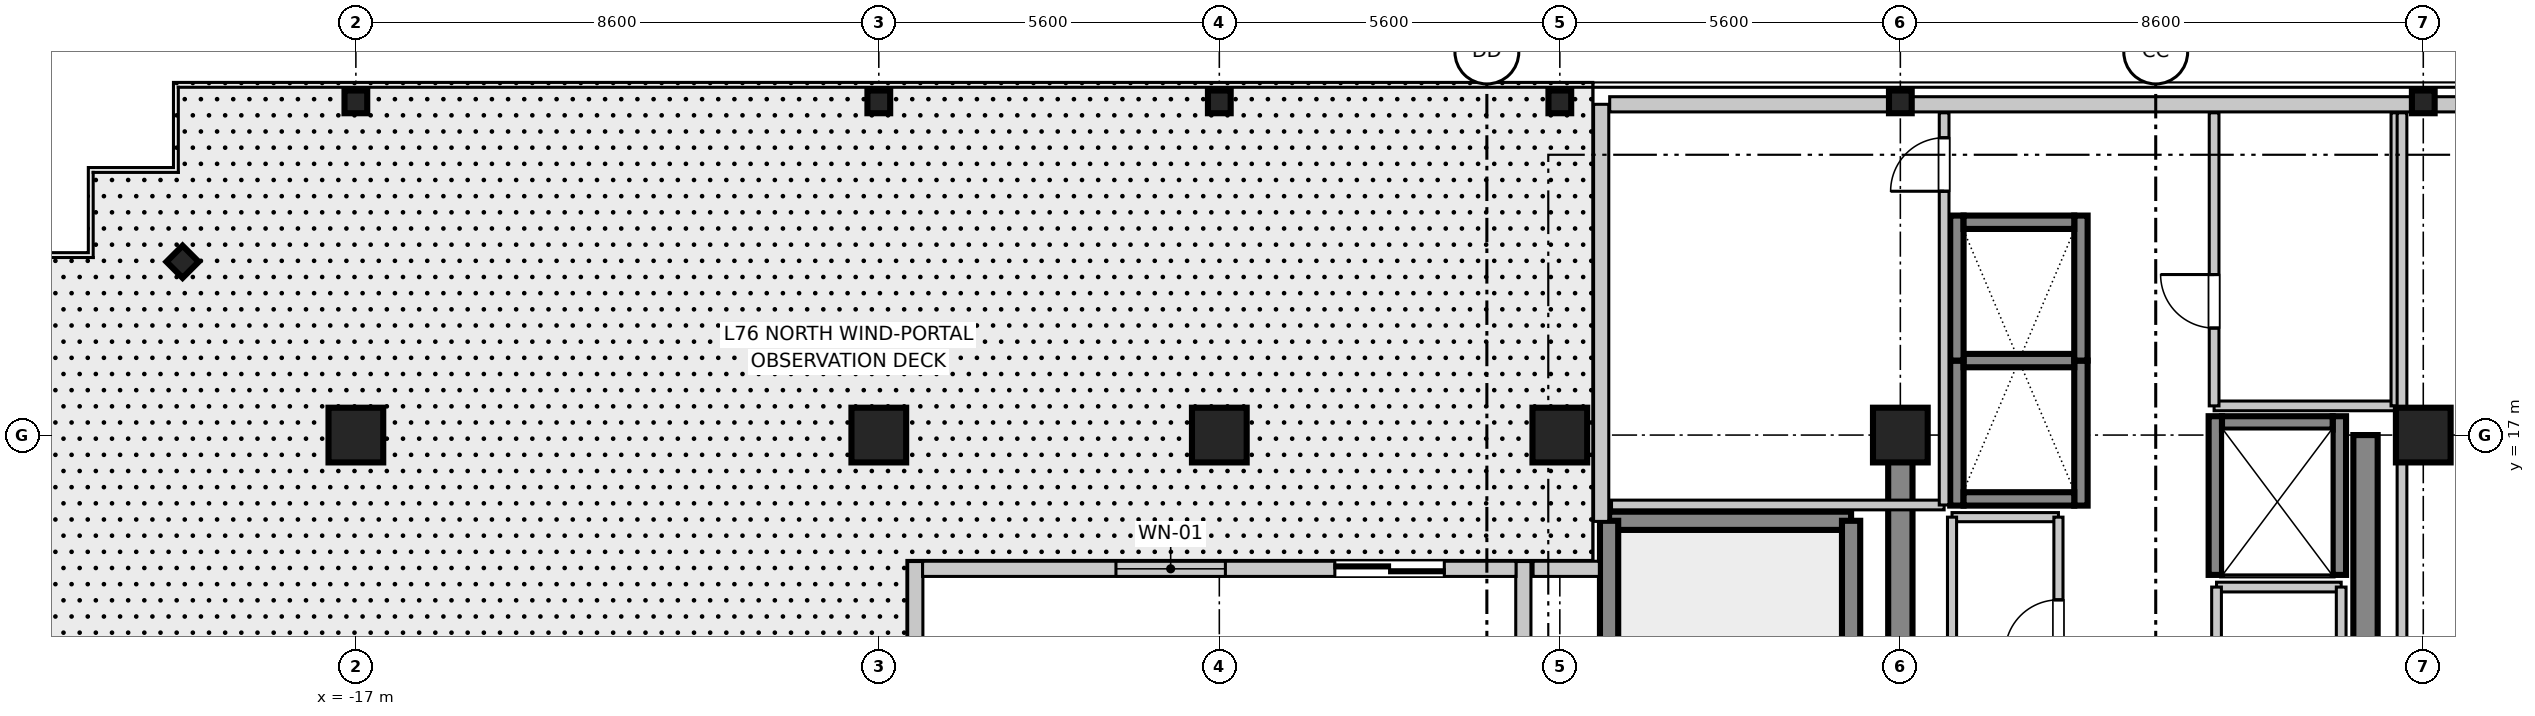
"""IFC4 building model, lengths in metres.
Left out: names, types, materials, properties, quantities, classifications, styles, units other than length and angle.
Written with IfcOpenShell. Run it as: python <this file> out.ifc"""

import sys

from ifc_helpers import new_model, si_unit, direction, frame, frame_2d, origin, origin_2d, place, context, subcontext, project, spatial, rectangle, i_section, extrude, source, transform, mapped, element, fill, save


model = new_model("IFC4")
c1 = context("Model", 3, precision=1e-05, world=origin(), true_north=direction((0.0, 1.0)))
c2 = subcontext(c1, "Body", "Model", "MODEL_VIEW")
j1 = project(units=[si_unit("LENGTHUNIT", "METRE"), si_unit("PLANEANGLEUNIT", "RADIAN")], contexts=[c1])
p1 = place(None, origin())
s1 = spatial("IfcSite", under=j1, at=p1, CompositionType="ELEMENT")
p2 = place(p1, origin())
s2 = spatial("IfcBuilding", under=s1, at=p2, CompositionType="ELEMENT")
p3 = place(p2, frame((0.0, 0.0, 296.5)))
s3 = spatial("IfcBuildingStorey", under=s2, at=p3, CompositionType="ELEMENT", Elevation=296.5)
m1 = source(origin(), c2, "Body", "SweptSolid", [
    extrude(rectangle(XDim=0.9, YDim=0.9, at=origin_2d()), origin(), (0.0, 0.0, 1.0), 3.805),
])
for number, where, z_axis, x_axis in (
    (1, (-17.0, 17.0, 0.0), (0.0, 0.0, 1.0), (1.0, 0.0, 0.0)),
    (2, (-8.4, 17.0, 0.0), (0.0, 0.0, 1.0), (1.0, 0.0, 0.0)),
    (3, (-2.8, 17.0, 0.0), (0.0, 0.0, 1.0), (1.0, 0.0, 0.0)),
    (4, (2.8, 17.0, 0.0), (0.0, 0.0, 1.0), (1.0, 0.0, 0.0)),
    (5, (8.4, 17.0, 0.0), (0.0, 0.0, 1.0), (1.0, 0.0, 0.0)),
    (6, (17.0, 17.0, 0.0), (0.0, 0.0, 1.0), (1.0, 0.0, 0.0)),
):
    element("IfcColumn", number, at=place(p3, frame(where, z_axis=z_axis, x_axis=x_axis)), inside=s3, PredefinedType="COLUMN", context=c2, shape_type="MappedRepresentation", body=[
        mapped(m1, transform((0.0, 0.0, 0.0), scale=1.0)),
    ])
m2 = source(origin(), c2, "Body", "SweptSolid", [
    extrude(i_section(OverallWidth=0.374, OverallDepth=0.374, WebThickness=0.014, FlangeThickness=0.023, at=origin_2d()), origin(), (0.0, 0.0, 1.0), 3.805),
])
for number, where, z_axis, x_axis in (
    (7, (-17.0, 22.48, 0.0), (0.0, 0.0, 1.0), (0.0, 1.0, 0.0)),
    (8, (-8.4, 22.48, 0.0), (0.0, 0.0, 1.0), (0.0, 1.0, 0.0)),
    (9, (-2.8, 22.48, 0.0), (0.0, 0.0, 1.0), (0.0, 1.0, 0.0)),
    (10, (2.8, 22.48, 0.0), (0.0, 0.0, 1.0), (0.0, 1.0, 0.0)),
    (11, (8.4, 22.48, 0.0), (0.0, 0.0, 1.0), (0.0, 1.0, 0.0)),
    (12, (17.0, 22.48, 0.0), (0.0, 0.0, 1.0), (0.0, 1.0, 0.0)),
    (13, (-19.85, 19.85, 0.0), (0.0, 0.0, 1.0), (0.707, 0.707, 0.0)),
):
    element("IfcColumn", number, at=place(p3, frame(where, z_axis=z_axis, x_axis=x_axis)), inside=s3, PredefinedType="COLUMN", context=c2, shape_type="MappedRepresentation", body=[
        mapped(m2, transform((0.0, 0.0, 0.0), scale=1.0)),
    ])
m3 = source(origin(), c2, "Body", "SweptSolid", [
    extrude(rectangle(XDim=7.65, YDim=0.4, at=frame_2d((3.825, 0.0))), origin(), (0.0, 0.0, 1.0), 3.55),
])
p4 = place(p3, frame((8.4, 9.35, 0.0), z_axis=(0.0, 0.0, 1.0), x_axis=(0.0, 1.0, 0.0)))
e14 = element("IfcWall", 14, at=p4, inside=s3, PredefinedType="SHEAR", context=c2, shape_type="MappedRepresentation", body=[
    mapped(m3, transform((0.0, 0.0, 0.0), scale=1.0)),
])
m4 = source(origin(), c2, "Body", "SweptSolid", [
    extrude(rectangle(XDim=11.6, YDim=0.4, at=frame_2d((5.8, 0.0))), origin(), (0.0, 0.0, 1.0), 3.55),
])
p5 = place(p3, frame((16.05, 5.4, 0.0), z_axis=(0.0, 0.0, 1.0), x_axis=(0.0, 1.0, 0.0)))
e15 = element("IfcWall", 15, at=p5, inside=s3, PredefinedType="SHEAR", context=c2, shape_type="MappedRepresentation", body=[
    mapped(m4, transform((0.0, 0.0, 0.0), scale=1.0)),
])
m5 = source(origin(), c2, "Body", "SweptSolid", [
    extrude(rectangle(XDim=3.98, YDim=0.3, at=frame_2d((1.99, 0.0))), origin(), (0.0, 0.0, 1.0), 3.55),
])
p6 = place(p3, frame((3.61, 15.59, 0.0), z_axis=(0.0, 0.0, 1.0), x_axis=(1.0, 0.0, 0.0)))
e16 = element("IfcWall", 16, at=p6, inside=s3, PredefinedType="SHEAR", context=c2, shape_type="MappedRepresentation", body=[
    mapped(m5, transform((0.0, 0.0, 0.0), scale=1.0)),
])
m6 = source(origin(), c2, "Body", "SweptSolid", [
    extrude(rectangle(XDim=9.38, YDim=0.3, at=frame_2d((4.69, 0.0))), origin(), (0.0, 0.0, 1.0), 3.55),
])
for number, where, z_axis, x_axis in (
    (17, (3.61, 6.21, 0.0), (0.0, 0.0, 1.0), (0.0, 1.0, 0.0)),
    (18, (7.59, 6.21, 0.0), (0.0, 0.0, 1.0), (0.0, 1.0, 0.0)),
):
    element("IfcWall", number, at=place(p3, frame(where, z_axis=z_axis, x_axis=x_axis)), inside=s3, PredefinedType="SHEAR", context=c2, shape_type="MappedRepresentation", body=[
        mapped(m6, transform((0.0, 0.0, 0.0), scale=1.0)),
    ])
m7 = source(origin(), c2, "Body", "SweptSolid", [
    extrude(rectangle(XDim=2.385, YDim=0.22, at=frame_2d((1.192, 0.0))), origin(), (0.0, 0.0, 1.0), 3.55),
])
for number, where, z_axis, x_axis in (
    (19, (9.33, 15.84, 0.0), (0.0, 0.0, 1.0), (0.0, 1.0, 0.0)),
    (20, (11.37, 15.84, 0.0), (0.0, 0.0, 1.0), (0.0, 1.0, 0.0)),
):
    element("IfcWall", number, at=place(p3, frame(where, z_axis=z_axis, x_axis=x_axis)), inside=s3, PredefinedType="SHEAR", context=c2, shape_type="MappedRepresentation", body=[
        mapped(m7, transform((0.0, 0.0, 0.0), scale=1.0)),
    ])
m8 = source(origin(), c2, "Body", "SweptSolid", [
    extrude(rectangle(XDim=1.82, YDim=0.22, at=frame_2d((0.91, 0.0))), origin(), (0.0, 0.0, 1.0), 3.55),
])
p7 = place(p3, frame((9.44, 15.95, 0.0), z_axis=(0.0, 0.0, 1.0), x_axis=(1.0, 0.0, 0.0)))
e21 = element("IfcWall", 21, at=p7, inside=s3, PredefinedType="SHEAR", context=c2, shape_type="MappedRepresentation", body=[
    mapped(m8, transform((0.0, 0.0, 0.0), scale=1.0)),
])
m9 = source(origin(), c2, "Body", "SweptSolid", [
    extrude(rectangle(XDim=1.82, YDim=0.22, at=frame_2d((0.91, 0.0))), origin(), (0.0, 0.0, 1.0), 3.85),
])
p8 = place(p3, frame((9.44, 18.225, 0.0), z_axis=(0.0, 0.0, 1.0), x_axis=(1.0, 0.0, 0.0)))
e22 = element("IfcWall", 22, at=p8, inside=s3, PredefinedType="SHEAR", context=c2, shape_type="MappedRepresentation", body=[
    mapped(m9, transform((0.0, 0.0, 0.0), scale=1.0)),
])
for number, where, z_axis, x_axis in (
    (23, (9.33, 18.225, 0.0), (0.0, 0.0, 1.0), (0.0, 1.0, 0.0)),
    (24, (11.37, 18.225, 0.0), (0.0, 0.0, 1.0), (0.0, 1.0, 0.0)),
):
    element("IfcWall", number, at=place(p3, frame(where, z_axis=z_axis, x_axis=x_axis)), inside=s3, PredefinedType="SHEAR", context=c2, shape_type="MappedRepresentation", body=[
        mapped(m7, transform((0.0, 0.0, 0.0), scale=1.0)),
    ])
p9 = place(p3, frame((9.44, 20.5, 0.0), z_axis=(0.0, 0.0, 1.0), x_axis=(1.0, 0.0, 0.0)))
e25 = element("IfcWall", 25, at=p9, inside=s3, PredefinedType="SHEAR", context=c2, shape_type="MappedRepresentation", body=[
    mapped(m8, transform((0.0, 0.0, 0.0), scale=1.0)),
])
m10 = source(origin(), c2, "Body", "SweptSolid", [
    extrude(rectangle(XDim=2.61, YDim=0.22, at=frame_2d((1.305, 0.0))), origin(), (0.0, 0.0, 1.0), 3.55),
])
for number, where, z_axis, x_axis in (
    (26, (13.58, 14.7, 0.0), (0.0, 0.0, 1.0), (0.0, 1.0, 0.0)),
    (27, (15.62, 14.7, 0.0), (0.0, 0.0, 1.0), (0.0, 1.0, 0.0)),
):
    element("IfcWall", number, at=place(p3, frame(where, z_axis=z_axis, x_axis=x_axis)), inside=s3, PredefinedType="SHEAR", context=c2, shape_type="MappedRepresentation", body=[
        mapped(m10, transform((0.0, 0.0, 0.0), scale=1.0)),
    ])
p10 = place(p3, frame((13.69, 17.2, 0.0), z_axis=(0.0, 0.0, 1.0), x_axis=(1.0, 0.0, 0.0)))
e28 = element("IfcWall", 28, at=p10, inside=s3, PredefinedType="SHEAR", context=c2, shape_type="MappedRepresentation", body=[
    mapped(m8, transform((0.0, 0.0, 0.0), scale=1.0)),
])
m11 = source(origin(), c2, "Body", "SweptSolid", [
    extrude(rectangle(XDim=8.84, YDim=0.25, at=frame_2d((4.42, 0.0))), origin(), (0.0, 0.0, 1.0), 2.99),
])
for number, where, z_axis, x_axis in (
    (29, (-7.8, 6.08, 0.0), (0.0, 0.0, 1.0), (0.0, 1.0, 0.0)),
    (30, (2.2, 6.08, 0.0), (0.0, 0.0, 1.0), (0.0, 1.0, 0.0)),
):
    element("IfcWall", number, at=place(p3, frame(where, z_axis=z_axis, x_axis=x_axis)), inside=s3, PredefinedType="STANDARD", context=c2, shape_type="MappedRepresentation", body=[
        mapped(m11, transform((0.0, 0.0, 0.0), scale=1.0)),
    ])
m12 = source(origin(), c2, "Body", "SweptSolid", [
    extrude(rectangle(XDim=9.76, YDim=0.25, at=frame_2d((4.88, 0.0))), origin(), (0.0, 0.0, 1.0), 2.99),
])
p11 = place(p3, frame((-7.68, 14.8, 0.0), z_axis=(0.0, 0.0, 1.0), x_axis=(1.0, 0.0, 0.0)))
e31 = element("IfcWall", 31, at=p11, inside=s3, PredefinedType="STANDARD", context=c2, shape_type="MappedRepresentation", body=[
    mapped(m12, transform((0.0, 0.0, 0.0), scale=1.0)),
])
p12 = place(p11, frame((6.78, 0.0, 0.0)))
e32 = element("IfcOpeningElement", 32, at=p12, cuts=e31, PredefinedType="OPENING", context=c2, shape_type="SweptSolid", body=[
    extrude(rectangle(XDim=1.8, YDim=2.25, at=frame_2d((0.9, 1.125))), frame((0.0, 0.135, 0.0), z_axis=(0.0, -1.0, 0.0), x_axis=(1.0, 0.0, 0.0)), (0.0, 0.0, 1.0), 0.27),
])
p13 = place(p11, frame((3.18, 0.0, 0.85)))
e33 = element("IfcOpeningElement", 33, at=p13, cuts=e31, PredefinedType="OPENING", context=c2, shape_type="SweptSolid", body=[
    extrude(rectangle(XDim=1.8, YDim=1.5, at=frame_2d((0.9, 0.75))), frame((0.0, 0.135, 0.0), z_axis=(0.0, -1.0, 0.0), x_axis=(1.0, 0.0, 0.0)), (0.0, 0.0, 1.0), 0.27),
])
m13 = source(origin(), c2, "Body", "SweptSolid", [
    extrude(rectangle(XDim=1.75, YDim=0.15, at=frame_2d((0.875, 0.0))), origin(), (0.0, 0.0, 1.0), 2.89),
])
p14 = place(p3, frame((9.25, 15.65, 0.0), z_axis=(0.0, 0.0, 1.0), x_axis=(1.0, 0.0, 0.0)))
e34 = element("IfcWall", 34, at=p14, inside=s3, PredefinedType="PARTITIONING", context=c2, shape_type="MappedRepresentation", body=[
    mapped(m13, transform((0.0, 0.0, 0.0), scale=1.0)),
])
m14 = source(origin(), c2, "Body", "SweptSolid", [
    extrude(rectangle(XDim=3.6, YDim=0.15, at=frame_2d((1.8, 0.0))), origin(), (0.0, 0.0, 1.0), 2.89),
])
p15 = place(p3, frame((9.25, 12.05, 0.0), z_axis=(0.0, 0.0, 1.0), x_axis=(0.0, 1.0, 0.0)))
e35 = element("IfcWall", 35, at=p15, inside=s3, PredefinedType="PARTITIONING", context=c2, shape_type="MappedRepresentation", body=[
    mapped(m14, transform((0.0, 0.0, 0.0), scale=1.0)),
])
p16 = place(p3, frame((11.0, 12.05, 0.0), z_axis=(0.0, 0.0, 1.0), x_axis=(0.0, 1.0, 0.0)))
e36 = element("IfcWall", 36, at=p16, inside=s3, PredefinedType="PARTITIONING", context=c2, shape_type="MappedRepresentation", body=[
    mapped(m14, transform((0.0, 0.0, 0.0), scale=1.0)),
])
p17 = place(p16, frame((1.36, 0.0, 0.0)))
e37 = element("IfcOpeningElement", 37, at=p17, cuts=e36, PredefinedType="OPENING", context=c2, shape_type="SweptSolid", body=[
    extrude(rectangle(XDim=0.88, YDim=2.1, at=frame_2d((0.44, 1.05))), frame((0.0, 0.085, 0.0), z_axis=(0.0, -1.0, 0.0), x_axis=(1.0, 0.0, 0.0)), (0.0, 0.0, 1.0), 0.17),
])
m15 = source(origin(), c2, "Body", "SweptSolid", [
    extrude(rectangle(XDim=1.09, YDim=0.25, at=frame_2d((0.545, 0.0))), origin(), (0.0, 0.0, 1.0), 2.89),
])
p18 = place(p3, frame((2.36, 14.8, 0.0), z_axis=(0.0, 0.0, 1.0), x_axis=(1.0, 0.0, 0.0)))
e38 = element("IfcWall", 38, at=p18, inside=s3, PredefinedType="STANDARD", context=c2, shape_type="MappedRepresentation", body=[
    mapped(m15, transform((0.0, 0.0, 0.0), scale=1.0)),
])
m16 = source(origin(), c2, "Body", "SweptSolid", [
    extrude(rectangle(XDim=6.86, YDim=0.25, at=frame_2d((3.43, 0.0))), origin(), (0.0, 0.0, 1.0), 2.89),
])
p19 = place(p3, frame((3.48, 15.58, 0.0), z_axis=(0.0, 0.0, 1.0), x_axis=(0.0, 1.0, 0.0)))
e39 = element("IfcWall", 39, at=p19, inside=s3, PredefinedType="STANDARD", context=c2, shape_type="MappedRepresentation", body=[
    mapped(m16, transform((0.0, 0.0, 0.0), scale=1.0)),
])
m17 = source(origin(), c2, "Body", "SweptSolid", [
    extrude(rectangle(XDim=16.0, YDim=0.25, at=frame_2d((8.0, 0.0))), origin(), (0.0, 0.0, 1.0), 2.89),
])
p20 = place(p3, frame((3.62, 22.44, 0.0), z_axis=(0.0, 0.0, 1.0), x_axis=(1.0, 0.0, 0.0)))
e40 = element("IfcWall", 40, at=p20, inside=s3, PredefinedType="STANDARD", context=c2, shape_type="MappedRepresentation", body=[
    mapped(m17, transform((0.0, 0.0, 0.0), scale=1.0)),
])
m18 = source(origin(), c2, "Body", "SweptSolid", [
    extrude(rectangle(XDim=2.05, YDim=0.16, at=frame_2d((1.025, 0.0))), origin(), (0.0, 0.0, 1.0), 2.89),
])
p21 = place(p3, frame((13.6, 14.5, 0.0), z_axis=(0.0, 0.0, 1.0), x_axis=(1.0, 0.0, 0.0)))
e41 = element("IfcWall", 41, at=p21, inside=s3, PredefinedType="PARTITIONING", context=c2, shape_type="MappedRepresentation", body=[
    mapped(m18, transform((0.0, 0.0, 0.0), scale=1.0)),
])
m19 = source(origin(), c2, "Body", "SweptSolid", [
    extrude(rectangle(XDim=8.7, YDim=0.16, at=frame_2d((4.35, 0.0))), origin(), (0.0, 0.0, 1.0), 2.89),
])
p22 = place(p3, frame((13.6, 5.8, 0.0), z_axis=(0.0, 0.0, 1.0), x_axis=(0.0, 1.0, 0.0)))
e42 = element("IfcWall", 42, at=p22, inside=s3, PredefinedType="PARTITIONING", context=c2, shape_type="MappedRepresentation", body=[
    mapped(m19, transform((0.0, 0.0, 0.0), scale=1.0)),
])
p23 = place(p22, frame((3.85, 0.0, 0.0)))
e43 = element("IfcOpeningElement", 43, at=p23, cuts=e42, PredefinedType="OPENING", context=c2, shape_type="SweptSolid", body=[
    extrude(rectangle(XDim=1.0, YDim=2.1, at=frame_2d((0.5, 1.05))), frame((0.0, 0.09, 0.0), z_axis=(0.0, -1.0, 0.0), x_axis=(1.0, 0.0, 0.0)), (0.0, 0.0, 1.0), 0.18),
])
p24 = place(p3, frame((15.65, 5.8, 0.0), z_axis=(0.0, 0.0, 1.0), x_axis=(0.0, 1.0, 0.0)))
e44 = element("IfcWall", 44, at=p24, inside=s3, PredefinedType="PARTITIONING", context=c2, shape_type="MappedRepresentation", body=[
    mapped(m19, transform((0.0, 0.0, 0.0), scale=1.0)),
])
m20 = source(origin(), c2, "Body", "SweptSolid", [
    extrude(rectangle(XDim=5.47, YDim=0.16, at=frame_2d((2.735, 0.0))), origin(), (0.0, 0.0, 1.0), 2.89),
])
p25 = place(p3, frame((3.65, 15.85, 0.0), z_axis=(0.0, 0.0, 1.0), x_axis=(1.0, 0.0, 0.0)))
e45 = element("IfcWall", 45, at=p25, inside=s3, PredefinedType="PARTITIONING", context=c2, shape_type="MappedRepresentation", body=[
    mapped(m20, transform((0.0, 0.0, 0.0), scale=1.0)),
])
m21 = source(origin(), c2, "Body", "SweptSolid", [
    extrude(rectangle(XDim=6.45, YDim=0.16, at=frame_2d((3.225, 0.0))), origin(), (0.0, 0.0, 1.0), 2.89),
])
p26 = place(p3, frame((9.12, 15.85, 0.0), z_axis=(0.0, 0.0, 1.0), x_axis=(0.0, 1.0, 0.0)))
e46 = element("IfcWall", 46, at=p26, inside=s3, PredefinedType="PARTITIONING", context=c2, shape_type="MappedRepresentation", body=[
    mapped(m21, transform((0.0, 0.0, 0.0), scale=1.0)),
])
p27 = place(p26, frame((5.16, 0.0, 0.0)))
e47 = element("IfcOpeningElement", 47, at=p27, cuts=e46, PredefinedType="OPENING", context=c2, shape_type="SweptSolid", body=[
    extrude(rectangle(XDim=0.88, YDim=2.1, at=frame_2d((0.44, 1.05))), frame((0.0, 0.09, 0.0), z_axis=(0.0, -1.0, 0.0), x_axis=(1.0, 0.0, 0.0)), (0.0, 0.0, 1.0), 0.18),
])
m22 = source(origin(), c2, "Body", "SweptSolid", [
    extrude(rectangle(XDim=2.99, YDim=0.16, at=frame_2d((1.495, 0.0))), origin(), (0.0, 0.0, 1.0), 2.89),
])
p28 = place(p3, frame((13.56, 17.48, 0.0), z_axis=(0.0, 0.0, 1.0), x_axis=(1.0, 0.0, 0.0)))
e48 = element("IfcWall", 48, at=p28, inside=s3, PredefinedType="PARTITIONING", context=c2, shape_type="MappedRepresentation", body=[
    mapped(m22, transform((0.0, 0.0, 0.0), scale=1.0)),
])
m23 = source(origin(), c2, "Body", "SweptSolid", [
    extrude(rectangle(XDim=4.82, YDim=0.16, at=frame_2d((2.41, 0.0))), origin(), (0.0, 0.0, 1.0), 2.89),
])
p29 = place(p3, frame((13.56, 17.48, 0.0), z_axis=(0.0, 0.0, 1.0), x_axis=(0.0, 1.0, 0.0)))
e49 = element("IfcWall", 49, at=p29, inside=s3, PredefinedType="PARTITIONING", context=c2, shape_type="MappedRepresentation", body=[
    mapped(m23, transform((0.0, 0.0, 0.0), scale=1.0)),
])
p30 = place(p29, frame((1.28, 0.0, 0.0)))
e50 = element("IfcOpeningElement", 50, at=p30, cuts=e49, PredefinedType="OPENING", context=c2, shape_type="SweptSolid", body=[
    extrude(rectangle(XDim=0.88, YDim=2.1, at=frame_2d((0.44, 1.05))), frame((0.0, 0.09, 0.0), z_axis=(0.0, -1.0, 0.0), x_axis=(1.0, 0.0, 0.0)), (0.0, 0.0, 1.0), 0.18),
])
p31 = place(p3, frame((16.55, 17.48, 0.0), z_axis=(0.0, 0.0, 1.0), x_axis=(0.0, 1.0, 0.0)))
e51 = element("IfcWall", 51, at=p31, inside=s3, PredefinedType="PARTITIONING", context=c2, shape_type="MappedRepresentation", body=[
    mapped(m23, transform((0.0, 0.0, 0.0), scale=1.0)),
])
m24 = source(origin(), c2, "Body", "SweptSolid", [
    extrude(rectangle(XDim=17.74, YDim=0.16, at=frame_2d((8.87, 0.0))), origin(), (0.0, 0.0, 1.0), 2.89),
])
p32 = place(p3, frame((16.65, 4.56, 0.0), z_axis=(0.0, 0.0, 1.0), x_axis=(0.0, 1.0, 0.0)))
e52 = element("IfcWall", 52, at=p32, inside=s3, PredefinedType="PARTITIONING", context=c2, shape_type="MappedRepresentation", body=[
    mapped(m24, transform((0.0, 0.0, 0.0), scale=1.0)),
])
m25 = source(origin(), c2, "Body", "SweptSolid", [
    extrude(rectangle(XDim=1.8, YDim=2.25, at=frame_2d((0.9, 1.125))), frame((0.0, 0.025, 0.0), z_axis=(0.0, -1.0, 0.0), x_axis=(1.0, 0.0, 0.0)), (0.0, 0.0, 1.0), 0.05),
])
p33 = place(p12, origin())
e53 = element("IfcDoor", 53, at=p33, inside=s3, OperationType="DOUBLE_DOOR_SLIDING", PredefinedType="DOOR", context=c2, shape_type="MappedRepresentation", body=[
    mapped(m25, transform((0.0, 0.0, 0.0), scale=1.0)),
])
fill(e32, e53)
m26 = source(origin(), c2, "Body", "SweptSolid", [
    extrude(rectangle(XDim=1.8, YDim=1.5, at=frame_2d((0.9, 0.75))), frame((0.0, 0.03, 0.0), z_axis=(0.0, -1.0, 0.0), x_axis=(1.0, 0.0, 0.0)), (0.0, 0.0, 1.0), 0.06),
])
p34 = place(p13, origin())
e54 = element("IfcWindow", 54, at=p34, inside=s3, PartitioningType="SINGLE_PANEL", PredefinedType="WINDOW", context=c2, shape_type="MappedRepresentation", body=[
    mapped(m26, transform((0.0, 0.0, 0.0), scale=1.0)),
])
fill(e33, e54)
m27 = source(origin(), c2, "Body", "SweptSolid", [
    extrude(rectangle(XDim=0.88, YDim=2.1, at=frame_2d((0.44, 1.05))), frame((0.0, 0.025, 0.0), z_axis=(0.0, -1.0, 0.0), x_axis=(1.0, 0.0, 0.0)), (0.0, 0.0, 1.0), 0.05),
])
p35 = place(p17, origin())
e55 = element("IfcDoor", 55, at=p35, inside=s3, OperationType="SINGLE_SWING_LEFT", PredefinedType="DOOR", context=c2, shape_type="MappedRepresentation", body=[
    mapped(m27, transform((0.0, 0.0, 0.0), scale=1.0)),
])
fill(e37, e55)
p36 = place(p27, origin())
e56 = element("IfcDoor", 56, at=p36, inside=s3, OperationType="SINGLE_SWING_LEFT", PredefinedType="DOOR", context=c2, shape_type="MappedRepresentation", body=[
    mapped(m27, transform((0.0, 0.0, 0.0), scale=1.0)),
])
fill(e47, e56)
p37 = place(p30, frame((0.88, 0.0, 0.0), z_axis=(0.0, 0.0, 1.0), x_axis=(-1.0, 0.0, 0.0)))
e57 = element("IfcDoor", 57, at=p37, inside=s3, OperationType="SINGLE_SWING_RIGHT", PredefinedType="DOOR", context=c2, shape_type="MappedRepresentation", body=[
    mapped(m27, transform((0.0, 0.0, 0.0), scale=1.0)),
])
fill(e50, e57)
save(model, sys.argv[1])
